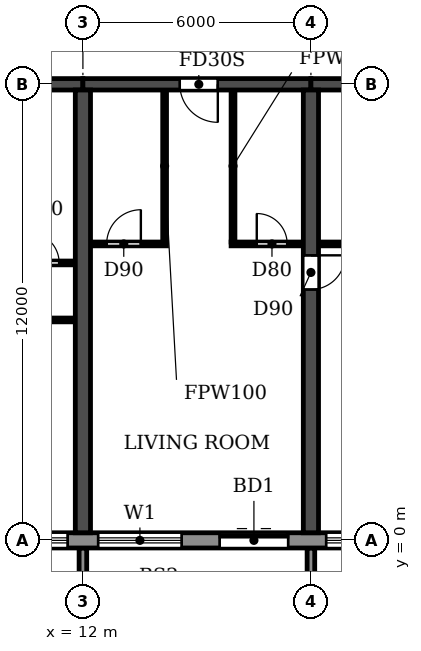
"""IFC4 building model, lengths in metres.
Left out: names, types, materials, properties, quantities, classifications, styles, units other than length and angle.
Written with IfcOpenShell. Run it as: python <this file> out.ifc"""

import sys

from ifc_helpers import new_model, si_unit, direction, frame, frame_2d, origin, place, context, subcontext, project, spatial, polyline, rectangle, outline, extrude, source, transform, mapped, element, fill, save


model = new_model("IFC4")
c1 = context("Model", 3, precision=1e-05, world=origin(), true_north=direction((0.0, 1.0)))
c2 = subcontext(c1, "Body", "Model", "MODEL_VIEW")
j1 = project(units=[si_unit("LENGTHUNIT", "METRE"), si_unit("PLANEANGLEUNIT", "RADIAN")], contexts=[c1])
p1 = place(None, origin())
s1 = spatial("IfcSite", under=j1, at=p1, CompositionType="ELEMENT")
p2 = place(p1, origin())
s2 = spatial("IfcBuilding", under=s1, at=p2, CompositionType="ELEMENT")
p3 = place(p2, frame((0.0, 0.0, 49.8)))
s3 = spatial("IfcBuildingStorey", under=s2, at=p3, CompositionType="ELEMENT", Elevation=49.8)
p4 = place(p3, frame((12.0, 0.2, 0.0), z_axis=(0.0, 0.0, 1.0), x_axis=(0.0, 1.0, 0.0)))
e1 = element("IfcWall", 1, at=p4, inside=s3, PredefinedType="SHEAR", context=c2, shape_type="SweptSolid", body=[
    extrude(rectangle(XDim=11.65, YDim=0.4, at=frame_2d((5.825, 0.0))), origin(), (0.0, 0.0, 1.0), 3.0),
])
p5 = place(p3, frame((18.0, 0.2, 0.0), z_axis=(0.0, 0.0, 1.0), x_axis=(0.0, 1.0, 0.0)))
e2 = element("IfcWall", 2, at=p5, inside=s3, PredefinedType="SHEAR", context=c2, shape_type="SweptSolid", body=[
    extrude(rectangle(XDim=11.65, YDim=0.4, at=frame_2d((5.825, 0.0))), origin(), (0.0, 0.0, 1.0), 3.0),
])
p6 = place(p5, frame((6.4, 0.0, 0.0)))
e3 = element("IfcOpeningElement", 3, at=p6, cuts=e2, PredefinedType="OPENING", context=c2, shape_type="SweptSolid", body=[
    extrude(rectangle(XDim=0.9, YDim=2.1, at=frame_2d((0.45, 1.05))), frame((0.0, 0.21, 0.0), z_axis=(0.0, -1.0, 0.0), x_axis=(1.0, 0.0, 0.0)), (0.0, 0.0, 1.0), 0.42),
])
p7 = place(p3, frame((6.0, 12.0, 0.0), z_axis=(0.0, 0.0, 1.0), x_axis=(1.0, 0.0, 0.0)))
e4 = element("IfcWall", 4, at=p7, inside=s3, PredefinedType="SHEAR", context=c2, shape_type="SweptSolid", body=[
    extrude(rectangle(XDim=6.0, YDim=0.3, at=frame_2d((3.0, 0.0))), origin(), (0.0, 0.0, 1.0), 2.4),
])
p8 = place(p7, frame((2.55, 0.0, 0.0)))
e5 = element("IfcOpeningElement", 5, at=p8, cuts=e4, PredefinedType="OPENING", context=c2, shape_type="SweptSolid", body=[
    extrude(rectangle(XDim=1.0, YDim=2.1, at=frame_2d((0.5, 1.05))), frame((0.0, 0.16, 0.0), z_axis=(0.0, -1.0, 0.0), x_axis=(1.0, 0.0, 0.0)), (0.0, 0.0, 1.0), 0.32),
])
p9 = place(p3, frame((12.0, 12.0, 0.0), z_axis=(0.0, 0.0, 1.0), x_axis=(1.0, 0.0, 0.0)))
e6 = element("IfcWall", 6, at=p9, inside=s3, PredefinedType="SHEAR", context=c2, shape_type="SweptSolid", body=[
    extrude(rectangle(XDim=6.0, YDim=0.3, at=frame_2d((3.0, 0.0))), origin(), (0.0, 0.0, 1.0), 2.4),
])
p10 = place(p9, frame((2.55, 0.0, 0.0)))
e7 = element("IfcOpeningElement", 7, at=p10, cuts=e6, PredefinedType="OPENING", context=c2, shape_type="SweptSolid", body=[
    extrude(rectangle(XDim=1.0, YDim=2.1, at=frame_2d((0.5, 1.05))), frame((0.0, 0.16, 0.0), z_axis=(0.0, -1.0, 0.0), x_axis=(1.0, 0.0, 0.0)), (0.0, 0.0, 1.0), 0.32),
])
p11 = place(p3, frame((18.0, 12.0, 0.0), z_axis=(0.0, 0.0, 1.0), x_axis=(1.0, 0.0, 0.0)))
e8 = element("IfcWall", 8, at=p11, inside=s3, PredefinedType="SHEAR", context=c2, shape_type="SweptSolid", body=[
    extrude(rectangle(XDim=6.0, YDim=0.3, at=frame_2d((3.0, 0.0))), origin(), (0.0, 0.0, 1.0), 2.4),
])
p12 = place(p3, frame((4.683, 0.0, 0.0), z_axis=(0.0, 0.0, 1.0), x_axis=(1.0, 0.0, 0.0)))
e9 = element("IfcWall", 9, at=p12, inside=s3, PredefinedType="STANDARD", context=c2, shape_type="SweptSolid", body=[
    extrude(rectangle(XDim=92.634, YDim=0.4, at=frame_2d((46.317, 0.0))), origin(), (0.0, 0.0, 1.0), 3.0),
])
p13 = place(p12, frame((1.717, 0.0, 0.9)))
e10 = element("IfcOpeningElement", 10, at=p13, cuts=e9, PredefinedType="OPENING", context=c2, shape_type="SweptSolid", body=[
    extrude(rectangle(XDim=2.2, YDim=1.5, at=frame_2d((1.1, 0.75))), frame((0.0, 0.21, 0.0), z_axis=(0.0, -1.0, 0.0), x_axis=(1.0, 0.0, 0.0)), (0.0, 0.0, 1.0), 0.42),
])
p14 = place(p12, frame((4.717, 0.0, 0.9)))
e11 = element("IfcOpeningElement", 11, at=p14, cuts=e9, PredefinedType="OPENING", context=c2, shape_type="SweptSolid", body=[
    extrude(rectangle(XDim=2.2, YDim=1.5, at=frame_2d((1.1, 0.75))), frame((0.0, 0.21, 0.0), z_axis=(0.0, -1.0, 0.0), x_axis=(1.0, 0.0, 0.0)), (0.0, 0.0, 1.0), 0.42),
])
p15 = place(p12, frame((7.717, 0.0, 0.9)))
e12 = element("IfcOpeningElement", 12, at=p15, cuts=e9, PredefinedType="OPENING", context=c2, shape_type="SweptSolid", body=[
    extrude(rectangle(XDim=2.2, YDim=1.5, at=frame_2d((1.1, 0.75))), frame((0.0, 0.21, 0.0), z_axis=(0.0, -1.0, 0.0), x_axis=(1.0, 0.0, 0.0)), (0.0, 0.0, 1.0), 0.42),
])
p16 = place(p12, frame((10.917, 0.0, 0.0)))
e13 = element("IfcOpeningElement", 13, at=p16, cuts=e9, PredefinedType="OPENING", context=c2, shape_type="SweptSolid", body=[
    extrude(rectangle(XDim=1.8, YDim=2.4, at=frame_2d((0.9, 1.2))), frame((0.0, 0.21, 0.0), z_axis=(0.0, -1.0, 0.0), x_axis=(1.0, 0.0, 0.0)), (0.0, 0.0, 1.0), 0.42),
])
p17 = place(p12, frame((13.717, 0.0, 0.9)))
e14 = element("IfcOpeningElement", 14, at=p17, cuts=e9, PredefinedType="OPENING", context=c2, shape_type="SweptSolid", body=[
    extrude(rectangle(XDim=2.2, YDim=1.5, at=frame_2d((1.1, 0.75))), frame((0.0, 0.21, 0.0), z_axis=(0.0, -1.0, 0.0), x_axis=(1.0, 0.0, 0.0)), (0.0, 0.0, 1.0), 0.42),
])
p18 = place(p12, frame((16.717, 0.0, 0.9)))
e15 = element("IfcOpeningElement", 15, at=p18, cuts=e9, PredefinedType="OPENING", context=c2, shape_type="SweptSolid", body=[
    extrude(rectangle(XDim=2.2, YDim=1.5, at=frame_2d((1.1, 0.75))), frame((0.0, 0.21, 0.0), z_axis=(0.0, -1.0, 0.0), x_axis=(1.0, 0.0, 0.0)), (0.0, 0.0, 1.0), 0.42),
])
p19 = place(p12, frame((19.917, 0.0, 0.0)))
e16 = element("IfcOpeningElement", 16, at=p19, cuts=e9, PredefinedType="OPENING", context=c2, shape_type="SweptSolid", body=[
    extrude(rectangle(XDim=1.8, YDim=2.4, at=frame_2d((0.9, 1.2))), frame((0.0, 0.21, 0.0), z_axis=(0.0, -1.0, 0.0), x_axis=(1.0, 0.0, 0.0)), (0.0, 0.0, 1.0), 0.42),
])
p20 = place(p12, frame((22.717, 0.0, 0.9)))
e17 = element("IfcOpeningElement", 17, at=p20, cuts=e9, PredefinedType="OPENING", context=c2, shape_type="SweptSolid", body=[
    extrude(rectangle(XDim=2.2, YDim=1.5, at=frame_2d((1.1, 0.75))), frame((0.0, 0.21, 0.0), z_axis=(0.0, -1.0, 0.0), x_axis=(1.0, 0.0, 0.0)), (0.0, 0.0, 1.0), 0.42),
])
p21 = place(p12, frame((25.717, 0.0, 0.9)))
e18 = element("IfcOpeningElement", 18, at=p21, cuts=e9, PredefinedType="OPENING", context=c2, shape_type="SweptSolid", body=[
    extrude(rectangle(XDim=2.2, YDim=1.5, at=frame_2d((1.1, 0.75))), frame((0.0, 0.21, 0.0), z_axis=(0.0, -1.0, 0.0), x_axis=(1.0, 0.0, 0.0)), (0.0, 0.0, 1.0), 0.42),
])
p22 = place(p12, frame((28.717, 0.0, 0.9)))
e19 = element("IfcOpeningElement", 19, at=p22, cuts=e9, PredefinedType="OPENING", context=c2, shape_type="SweptSolid", body=[
    extrude(rectangle(XDim=2.2, YDim=1.5, at=frame_2d((1.1, 0.75))), frame((0.0, 0.21, 0.0), z_axis=(0.0, -1.0, 0.0), x_axis=(1.0, 0.0, 0.0)), (0.0, 0.0, 1.0), 0.42),
])
p23 = place(p12, frame((31.717, 0.0, 0.9)))
e20 = element("IfcOpeningElement", 20, at=p23, cuts=e9, PredefinedType="OPENING", context=c2, shape_type="SweptSolid", body=[
    extrude(rectangle(XDim=2.2, YDim=1.5, at=frame_2d((1.1, 0.75))), frame((0.0, 0.21, 0.0), z_axis=(0.0, -1.0, 0.0), x_axis=(1.0, 0.0, 0.0)), (0.0, 0.0, 1.0), 0.42),
])
p24 = place(p12, frame((34.917, 0.0, 0.0)))
e21 = element("IfcOpeningElement", 21, at=p24, cuts=e9, PredefinedType="OPENING", context=c2, shape_type="SweptSolid", body=[
    extrude(rectangle(XDim=1.8, YDim=2.4, at=frame_2d((0.9, 1.2))), frame((0.0, 0.21, 0.0), z_axis=(0.0, -1.0, 0.0), x_axis=(1.0, 0.0, 0.0)), (0.0, 0.0, 1.0), 0.42),
])
p25 = place(p12, frame((37.717, 0.0, 0.9)))
e22 = element("IfcOpeningElement", 22, at=p25, cuts=e9, PredefinedType="OPENING", context=c2, shape_type="SweptSolid", body=[
    extrude(rectangle(XDim=2.2, YDim=1.5, at=frame_2d((1.1, 0.75))), frame((0.0, 0.21, 0.0), z_axis=(0.0, -1.0, 0.0), x_axis=(1.0, 0.0, 0.0)), (0.0, 0.0, 1.0), 0.42),
])
p26 = place(p12, frame((40.717, 0.0, 0.9)))
e23 = element("IfcOpeningElement", 23, at=p26, cuts=e9, PredefinedType="OPENING", context=c2, shape_type="SweptSolid", body=[
    extrude(rectangle(XDim=2.2, YDim=1.5, at=frame_2d((1.1, 0.75))), frame((0.0, 0.21, 0.0), z_axis=(0.0, -1.0, 0.0), x_axis=(1.0, 0.0, 0.0)), (0.0, 0.0, 1.0), 0.42),
])
p27 = place(p12, frame((43.717, 0.0, 0.9)))
e24 = element("IfcOpeningElement", 24, at=p27, cuts=e9, PredefinedType="OPENING", context=c2, shape_type="SweptSolid", body=[
    extrude(rectangle(XDim=2.2, YDim=1.5, at=frame_2d((1.1, 0.75))), frame((0.0, 0.21, 0.0), z_axis=(0.0, -1.0, 0.0), x_axis=(1.0, 0.0, 0.0)), (0.0, 0.0, 1.0), 0.42),
])
p28 = place(p12, frame((46.917, 0.0, 0.0)))
e25 = element("IfcOpeningElement", 25, at=p28, cuts=e9, PredefinedType="OPENING", context=c2, shape_type="SweptSolid", body=[
    extrude(rectangle(XDim=1.8, YDim=2.4, at=frame_2d((0.9, 1.2))), frame((0.0, 0.21, 0.0), z_axis=(0.0, -1.0, 0.0), x_axis=(1.0, 0.0, 0.0)), (0.0, 0.0, 1.0), 0.42),
])
p29 = place(p12, frame((49.717, 0.0, 0.9)))
e26 = element("IfcOpeningElement", 26, at=p29, cuts=e9, PredefinedType="OPENING", context=c2, shape_type="SweptSolid", body=[
    extrude(rectangle(XDim=2.2, YDim=1.5, at=frame_2d((1.1, 0.75))), frame((0.0, 0.21, 0.0), z_axis=(0.0, -1.0, 0.0), x_axis=(1.0, 0.0, 0.0)), (0.0, 0.0, 1.0), 0.42),
])
p30 = place(p12, frame((52.717, 0.0, 0.9)))
e27 = element("IfcOpeningElement", 27, at=p30, cuts=e9, PredefinedType="OPENING", context=c2, shape_type="SweptSolid", body=[
    extrude(rectangle(XDim=2.2, YDim=1.5, at=frame_2d((1.1, 0.75))), frame((0.0, 0.21, 0.0), z_axis=(0.0, -1.0, 0.0), x_axis=(1.0, 0.0, 0.0)), (0.0, 0.0, 1.0), 0.42),
])
p31 = place(p12, frame((55.717, 0.0, 0.9)))
e28 = element("IfcOpeningElement", 28, at=p31, cuts=e9, PredefinedType="OPENING", context=c2, shape_type="SweptSolid", body=[
    extrude(rectangle(XDim=2.2, YDim=1.5, at=frame_2d((1.1, 0.75))), frame((0.0, 0.21, 0.0), z_axis=(0.0, -1.0, 0.0), x_axis=(1.0, 0.0, 0.0)), (0.0, 0.0, 1.0), 0.42),
])
p32 = place(p12, frame((58.917, 0.0, 0.0)))
e29 = element("IfcOpeningElement", 29, at=p32, cuts=e9, PredefinedType="OPENING", context=c2, shape_type="SweptSolid", body=[
    extrude(rectangle(XDim=1.8, YDim=2.4, at=frame_2d((0.9, 1.2))), frame((0.0, 0.21, 0.0), z_axis=(0.0, -1.0, 0.0), x_axis=(1.0, 0.0, 0.0)), (0.0, 0.0, 1.0), 0.42),
])
p33 = place(p12, frame((61.717, 0.0, 0.9)))
e30 = element("IfcOpeningElement", 30, at=p33, cuts=e9, PredefinedType="OPENING", context=c2, shape_type="SweptSolid", body=[
    extrude(rectangle(XDim=2.2, YDim=1.5, at=frame_2d((1.1, 0.75))), frame((0.0, 0.21, 0.0), z_axis=(0.0, -1.0, 0.0), x_axis=(1.0, 0.0, 0.0)), (0.0, 0.0, 1.0), 0.42),
])
p34 = place(p12, frame((64.717, 0.0, 0.9)))
e31 = element("IfcOpeningElement", 31, at=p34, cuts=e9, PredefinedType="OPENING", context=c2, shape_type="SweptSolid", body=[
    extrude(rectangle(XDim=2.2, YDim=1.5, at=frame_2d((1.1, 0.75))), frame((0.0, 0.21, 0.0), z_axis=(0.0, -1.0, 0.0), x_axis=(1.0, 0.0, 0.0)), (0.0, 0.0, 1.0), 0.42),
])
p35 = place(p12, frame((67.717, 0.0, 0.9)))
e32 = element("IfcOpeningElement", 32, at=p35, cuts=e9, PredefinedType="OPENING", context=c2, shape_type="SweptSolid", body=[
    extrude(rectangle(XDim=2.2, YDim=1.5, at=frame_2d((1.1, 0.75))), frame((0.0, 0.21, 0.0), z_axis=(0.0, -1.0, 0.0), x_axis=(1.0, 0.0, 0.0)), (0.0, 0.0, 1.0), 0.42),
])
p36 = place(p12, frame((70.917, 0.0, 0.0)))
e33 = element("IfcOpeningElement", 33, at=p36, cuts=e9, PredefinedType="OPENING", context=c2, shape_type="SweptSolid", body=[
    extrude(rectangle(XDim=1.8, YDim=2.4, at=frame_2d((0.9, 1.2))), frame((0.0, 0.21, 0.0), z_axis=(0.0, -1.0, 0.0), x_axis=(1.0, 0.0, 0.0)), (0.0, 0.0, 1.0), 0.42),
])
p37 = place(p12, frame((73.717, 0.0, 0.9)))
e34 = element("IfcOpeningElement", 34, at=p37, cuts=e9, PredefinedType="OPENING", context=c2, shape_type="SweptSolid", body=[
    extrude(rectangle(XDim=2.2, YDim=1.5, at=frame_2d((1.1, 0.75))), frame((0.0, 0.21, 0.0), z_axis=(0.0, -1.0, 0.0), x_axis=(1.0, 0.0, 0.0)), (0.0, 0.0, 1.0), 0.42),
])
p38 = place(p12, frame((76.717, 0.0, 0.9)))
e35 = element("IfcOpeningElement", 35, at=p38, cuts=e9, PredefinedType="OPENING", context=c2, shape_type="SweptSolid", body=[
    extrude(rectangle(XDim=2.2, YDim=1.5, at=frame_2d((1.1, 0.75))), frame((0.0, 0.21, 0.0), z_axis=(0.0, -1.0, 0.0), x_axis=(1.0, 0.0, 0.0)), (0.0, 0.0, 1.0), 0.42),
])
p39 = place(p12, frame((79.717, 0.0, 0.9)))
e36 = element("IfcOpeningElement", 36, at=p39, cuts=e9, PredefinedType="OPENING", context=c2, shape_type="SweptSolid", body=[
    extrude(rectangle(XDim=2.2, YDim=1.5, at=frame_2d((1.1, 0.75))), frame((0.0, 0.21, 0.0), z_axis=(0.0, -1.0, 0.0), x_axis=(1.0, 0.0, 0.0)), (0.0, 0.0, 1.0), 0.42),
])
p40 = place(p12, frame((82.917, 0.0, 0.0)))
e37 = element("IfcOpeningElement", 37, at=p40, cuts=e9, PredefinedType="OPENING", context=c2, shape_type="SweptSolid", body=[
    extrude(rectangle(XDim=1.8, YDim=2.4, at=frame_2d((0.9, 1.2))), frame((0.0, 0.21, 0.0), z_axis=(0.0, -1.0, 0.0), x_axis=(1.0, 0.0, 0.0)), (0.0, 0.0, 1.0), 0.42),
])
p41 = place(p12, frame((85.717, 0.0, 0.9)))
e38 = element("IfcOpeningElement", 38, at=p41, cuts=e9, PredefinedType="OPENING", context=c2, shape_type="SweptSolid", body=[
    extrude(rectangle(XDim=2.2, YDim=1.5, at=frame_2d((1.1, 0.75))), frame((0.0, 0.21, 0.0), z_axis=(0.0, -1.0, 0.0), x_axis=(1.0, 0.0, 0.0)), (0.0, 0.0, 1.0), 0.42),
])
p42 = place(p12, frame((88.717, 0.0, 0.9)))
e39 = element("IfcOpeningElement", 39, at=p42, cuts=e9, PredefinedType="OPENING", context=c2, shape_type="SweptSolid", body=[
    extrude(rectangle(XDim=2.2, YDim=1.5, at=frame_2d((1.1, 0.75))), frame((0.0, 0.21, 0.0), z_axis=(0.0, -1.0, 0.0), x_axis=(1.0, 0.0, 0.0)), (0.0, 0.0, 1.0), 0.42),
])
m1 = source(origin(), c2, "Body", "SweptSolid", [
    extrude(outline(polyline([(0.0, 0.0), (0.2, 0.0), (0.2, 1.65), (0.0, 1.65), (0.0, 0.0)])), origin(), (0.0, 0.0, 1.0), 3.1),
])
for number, where in (
    (40, (11.9, -1.85, 0.0)),
    (41, (17.9, -1.85, 0.0)),
):
    element("IfcWall", number, at=place(p3, frame(where)), inside=s3, PredefinedType="STANDARD", context=c2, shape_type="MappedRepresentation", body=[
        mapped(m1, transform((0.0, 0.0, 0.0))),
    ])
p43 = place(p3, frame((8.95, 5.8, 0.0), z_axis=(0.0, 0.0, 1.0), x_axis=(1.0, 0.0, 0.0)))
e42 = element("IfcWall", 42, at=p43, inside=s3, PredefinedType="PARTITIONING", context=c2, shape_type="SweptSolid", body=[
    extrude(rectangle(XDim=2.84, YDim=0.1, at=frame_2d((1.42, 0.0))), origin(), (0.0, 0.0, 1.0), 3.0),
])
p44 = place(p43, frame((0.55, 0.0, 0.0)))
e43 = element("IfcOpeningElement", 43, at=p44, cuts=e42, PredefinedType="OPENING", context=c2, shape_type="SweptSolid", body=[
    extrude(rectangle(XDim=0.9, YDim=2.1, at=frame_2d((0.45, 1.05))), frame((0.0, 0.06, 0.0), z_axis=(0.0, -1.0, 0.0), x_axis=(1.0, 0.0, 0.0)), (0.0, 0.0, 1.0), 0.12),
])
p45 = place(p3, frame((9.9, 7.3, 0.0), z_axis=(0.0, 0.0, 1.0), x_axis=(1.0, 0.0, 0.0)))
e44 = element("IfcWall", 44, at=p45, inside=s3, PredefinedType="PARTITIONING", context=c2, shape_type="SweptSolid", body=[
    extrude(rectangle(XDim=1.89, YDim=0.1, at=frame_2d((0.945, 0.0))), origin(), (0.0, 0.0, 1.0), 3.0),
])
p46 = place(p45, frame((0.675, 0.0, 0.0)))
e45 = element("IfcOpeningElement", 45, at=p46, cuts=e44, PredefinedType="OPENING", context=c2, shape_type="SweptSolid", body=[
    extrude(rectangle(XDim=0.8, YDim=2.1, at=frame_2d((0.4, 1.05))), frame((0.0, 0.06, 0.0), z_axis=(0.0, -1.0, 0.0), x_axis=(1.0, 0.0, 0.0)), (0.0, 0.0, 1.0), 0.12),
])
p47 = place(p3, frame((12.21, 7.8, 0.0), z_axis=(0.0, 0.0, 1.0), x_axis=(1.0, 0.0, 0.0)))
e46 = element("IfcWall", 46, at=p47, inside=s3, PredefinedType="PARTITIONING", context=c2, shape_type="SweptSolid", body=[
    extrude(rectangle(XDim=1.99, YDim=0.1, at=frame_2d((0.995, 0.0))), origin(), (0.0, 0.0, 1.0), 3.0),
])
p48 = place(p47, frame((0.415, 0.0, 0.0)))
e47 = element("IfcOpeningElement", 47, at=p48, cuts=e46, PredefinedType="OPENING", context=c2, shape_type="SweptSolid", body=[
    extrude(rectangle(XDim=0.9, YDim=2.1, at=frame_2d((0.45, 1.05))), frame((0.0, 0.06, 0.0), z_axis=(0.0, -1.0, 0.0), x_axis=(1.0, 0.0, 0.0)), (0.0, 0.0, 1.0), 0.12),
])
p49 = place(p3, frame((15.9, 7.8, 0.0), z_axis=(0.0, 0.0, 1.0), x_axis=(1.0, 0.0, 0.0)))
e48 = element("IfcWall", 48, at=p49, inside=s3, PredefinedType="PARTITIONING", context=c2, shape_type="SweptSolid", body=[
    extrude(rectangle(XDim=1.89, YDim=0.1, at=frame_2d((0.945, 0.0))), origin(), (0.0, 0.0, 1.0), 3.0),
])
p50 = place(p49, frame((0.675, 0.0, 0.0)))
e49 = element("IfcOpeningElement", 49, at=p50, cuts=e48, PredefinedType="OPENING", context=c2, shape_type="SweptSolid", body=[
    extrude(rectangle(XDim=0.8, YDim=2.1, at=frame_2d((0.4, 1.05))), frame((0.0, 0.06, 0.0), z_axis=(0.0, -1.0, 0.0), x_axis=(1.0, 0.0, 0.0)), (0.0, 0.0, 1.0), 0.12),
])
p51 = place(p3, frame((18.21, 7.8, 0.0), z_axis=(0.0, 0.0, 1.0), x_axis=(1.0, 0.0, 0.0)))
e50 = element("IfcWall", 50, at=p51, inside=s3, PredefinedType="PARTITIONING", context=c2, shape_type="SweptSolid", body=[
    extrude(rectangle(XDim=2.69, YDim=0.1, at=frame_2d((1.345, 0.0))), origin(), (0.0, 0.0, 1.0), 3.0),
])
p52 = place(p51, frame((0.89, 0.0, 0.0)))
e51 = element("IfcOpeningElement", 51, at=p52, cuts=e50, PredefinedType="OPENING", context=c2, shape_type="SweptSolid", body=[
    extrude(rectangle(XDim=0.8, YDim=2.1, at=frame_2d((0.4, 1.05))), frame((0.0, 0.06, 0.0), z_axis=(0.0, -1.0, 0.0), x_axis=(1.0, 0.0, 0.0)), (0.0, 0.0, 1.0), 0.12),
])
for number, where, z_axis, x_axis in (
    (52, (14.15, 7.85, 0.0), (0.0, 0.0, 1.0), (0.0, 1.0, 0.0)),
    (53, (15.95, 7.85, 0.0), (0.0, 0.0, 1.0), (0.0, 1.0, 0.0)),
):
    element("IfcWall", number, at=place(p3, frame(where, z_axis=z_axis, x_axis=x_axis)), inside=s3, PredefinedType="PARTITIONING", context=c2, shape_type="SweptSolid", body=[
        extrude(rectangle(XDim=3.99, YDim=0.1, at=frame_2d((1.995, 0.0))), origin(), (0.0, 0.0, 1.0), 3.0),
    ])
p53 = place(p14, origin())
e54 = element("IfcWindow", 54, at=p53, inside=s3, PartitioningType="DOUBLE_PANEL_HORIZONTAL", PredefinedType="WINDOW", context=c2, shape_type="SweptSolid", body=[
    extrude(rectangle(XDim=2.2, YDim=1.5, at=frame_2d((1.1, 0.75))), frame((0.0, 0.03, 0.0), z_axis=(0.0, -1.0, 0.0), x_axis=(1.0, 0.0, 0.0)), (0.0, 0.0, 1.0), 0.06),
])
fill(e11, e54)
p54 = place(p15, origin())
e55 = element("IfcWindow", 55, at=p54, inside=s3, PartitioningType="DOUBLE_PANEL_HORIZONTAL", PredefinedType="WINDOW", context=c2, shape_type="SweptSolid", body=[
    extrude(rectangle(XDim=2.2, YDim=1.5, at=frame_2d((1.1, 0.75))), frame((0.0, 0.03, 0.0), z_axis=(0.0, -1.0, 0.0), x_axis=(1.0, 0.0, 0.0)), (0.0, 0.0, 1.0), 0.06),
])
fill(e12, e55)
p55 = place(p16, origin())
e56 = element("IfcDoor", 56, at=p55, inside=s3, OperationType="DOUBLE_DOOR_SLIDING", PredefinedType="DOOR", context=c2, shape_type="SweptSolid", body=[
    extrude(rectangle(XDim=1.8, YDim=2.4, at=frame_2d((0.9, 1.2))), frame((0.0, 0.025, 0.0), z_axis=(0.0, -1.0, 0.0), x_axis=(1.0, 0.0, 0.0)), (0.0, 0.0, 1.0), 0.05),
])
fill(e13, e56)
p56 = place(p17, origin())
e57 = element("IfcWindow", 57, at=p56, inside=s3, PartitioningType="DOUBLE_PANEL_HORIZONTAL", PredefinedType="WINDOW", context=c2, shape_type="SweptSolid", body=[
    extrude(rectangle(XDim=2.2, YDim=1.5, at=frame_2d((1.1, 0.75))), frame((0.0, 0.03, 0.0), z_axis=(0.0, -1.0, 0.0), x_axis=(1.0, 0.0, 0.0)), (0.0, 0.0, 1.0), 0.06),
])
fill(e14, e57)
p57 = place(p46, origin())
e58 = element("IfcDoor", 58, at=p57, inside=s3, OperationType="SINGLE_SWING_LEFT", PredefinedType="DOOR", context=c2, shape_type="SweptSolid", body=[
    extrude(rectangle(XDim=0.8, YDim=2.1, at=frame_2d((0.4, 1.05))), frame((0.0, 0.025, 0.0), z_axis=(0.0, -1.0, 0.0), x_axis=(1.0, 0.0, 0.0)), (0.0, 0.0, 1.0), 0.05),
])
fill(e45, e58)
p58 = place(p48, origin())
e59 = element("IfcDoor", 59, at=p58, inside=s3, OperationType="SINGLE_SWING_RIGHT", PredefinedType="DOOR", context=c2, shape_type="SweptSolid", body=[
    extrude(rectangle(XDim=0.9, YDim=2.1, at=frame_2d((0.45, 1.05))), frame((0.0, 0.025, 0.0), z_axis=(0.0, -1.0, 0.0), x_axis=(1.0, 0.0, 0.0)), (0.0, 0.0, 1.0), 0.05),
])
fill(e47, e59)
p59 = place(p10, frame((1.0, 0.0, 0.0), z_axis=(0.0, 0.0, 1.0), x_axis=(-1.0, 0.0, 0.0)))
e60 = element("IfcDoor", 60, at=p59, inside=s3, OperationType="SINGLE_SWING_LEFT", PredefinedType="DOOR", context=c2, shape_type="SweptSolid", body=[
    extrude(rectangle(XDim=1.0, YDim=2.1, at=frame_2d((0.5, 1.05))), frame((0.0, 0.025, 0.0), z_axis=(0.0, -1.0, 0.0), x_axis=(1.0, 0.0, 0.0)), (0.0, 0.0, 1.0), 0.05),
])
fill(e7, e60)
p60 = place(p50, origin())
e61 = element("IfcDoor", 61, at=p60, inside=s3, OperationType="SINGLE_SWING_LEFT", PredefinedType="DOOR", context=c2, shape_type="SweptSolid", body=[
    extrude(rectangle(XDim=0.8, YDim=2.1, at=frame_2d((0.4, 1.05))), frame((0.0, 0.025, 0.0), z_axis=(0.0, -1.0, 0.0), x_axis=(1.0, 0.0, 0.0)), (0.0, 0.0, 1.0), 0.05),
])
fill(e49, e61)
p61 = place(p6, frame((0.9, 0.0, 0.0), z_axis=(0.0, 0.0, 1.0), x_axis=(-1.0, 0.0, 0.0)))
e62 = element("IfcDoor", 62, at=p61, inside=s3, OperationType="SINGLE_SWING_LEFT", PredefinedType="DOOR", context=c2, shape_type="SweptSolid", body=[
    extrude(rectangle(XDim=0.9, YDim=2.1, at=frame_2d((0.45, 1.05))), frame((0.0, 0.025, 0.0), z_axis=(0.0, -1.0, 0.0), x_axis=(1.0, 0.0, 0.0)), (0.0, 0.0, 1.0), 0.05),
])
fill(e3, e62)
save(model, sys.argv[1])
